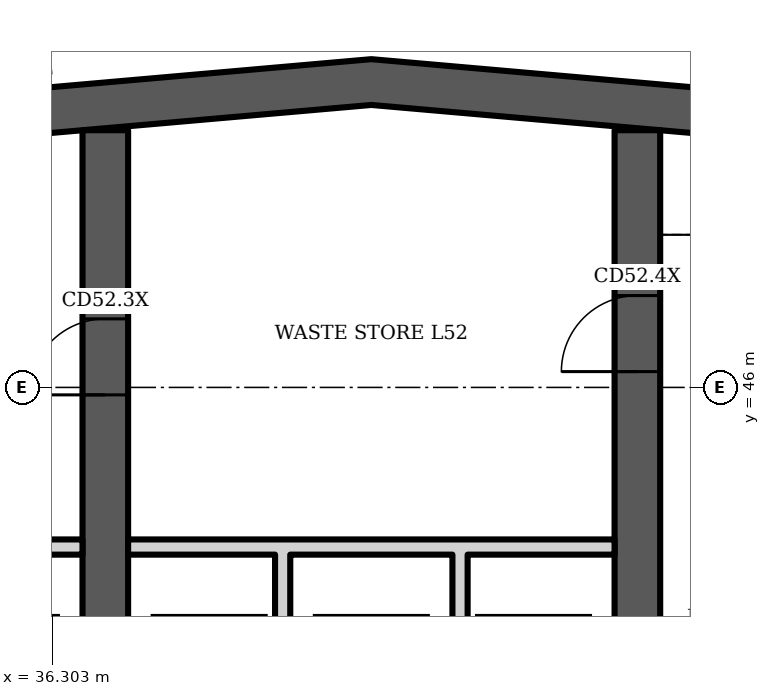
"""IFC4 building model, lengths in metres.
Left out: names, types, materials, properties, quantities, classifications, styles, units other than length and angle.
Written with IfcOpenShell. Run it as: python <this file> out.ifc"""

import sys

from ifc_helpers import new_model, si_unit, direction, frame, frame_2d, origin, place, context, subcontext, project, spatial, polyline, rectangle, outline, extrude, element, fill, save


model = new_model("IFC4")
c1 = context("Model", 3, precision=1e-05, world=origin(), true_north=direction((0.0, 1.0)))
c2 = subcontext(c1, "Body", "Model", "MODEL_VIEW")
j1 = project(units=[si_unit("LENGTHUNIT", "METRE"), si_unit("PLANEANGLEUNIT", "RADIAN")], contexts=[c1])
p1 = place(None, origin())
s1 = spatial("IfcSite", under=j1, at=p1, CompositionType="ELEMENT")
p2 = place(p1, origin())
s2 = spatial("IfcBuilding", under=s1, at=p2, CompositionType="ELEMENT")
p3 = place(p2, frame((0.0, 0.0, 210.7)))
s3 = spatial("IfcBuildingStorey", under=s2, at=p3, CompositionType="ELEMENT", Elevation=210.7)
p4 = place(p3, origin())
e1 = element("IfcWall", 1, at=p4, inside=s3, PredefinedType="SHEAR", context=c2, shape_type="SweptSolid", body=[
    extrude(outline(polyline([(23.0, 48.185), (40.5, 49.716), (58.0, 48.185), (58.0, 48.787), (40.5, 50.318), (23.0, 48.787), (23.0, 48.185)])), origin(), (0.0, 0.0, 1.0), 3.6),
])
p5 = place(p3, frame((37.0, 34.6, 0.0), z_axis=(0.0, 0.0, 1.0), x_axis=(0.0, 1.0, 0.0)))
e2 = element("IfcWall", 2, at=p5, inside=s3, PredefinedType="SHEAR", context=c2, shape_type="SweptSolid", body=[
    extrude(rectangle(XDim=14.784, YDim=0.6, at=frame_2d((7.392, 0.0))), origin(), (0.0, 0.0, 1.0), 3.6),
])
p6 = place(p5, frame((11.302, 0.0, 0.0)))
e3 = element("IfcOpeningElement", 3, at=p6, cuts=e2, PredefinedType="OPENING", context=c2, shape_type="SweptSolid", body=[
    extrude(rectangle(XDim=1.0, YDim=2.1, at=frame_2d((0.5, 1.05))), frame((0.0, 0.31, 0.0), z_axis=(0.0, -1.0, 0.0), x_axis=(1.0, 0.0, 0.0)), (0.0, 0.0, 1.0), 0.62),
])
p7 = place(p5, frame((3.8, 0.0, 0.0)))
e4 = element("IfcOpeningElement", 4, at=p7, cuts=e2, PredefinedType="OPENING", context=c2, shape_type="SweptSolid", body=[
    extrude(rectangle(XDim=1.1, YDim=2.1, at=frame_2d((0.55, 1.05))), frame((0.0, 0.31, 0.0), z_axis=(0.0, -1.0, 0.0), x_axis=(1.0, 0.0, 0.0)), (0.0, 0.0, 1.0), 0.62),
])
p8 = place(p3, frame((44.0, 34.6, 0.0), z_axis=(0.0, 0.0, 1.0), x_axis=(0.0, 1.0, 0.0)))
e5 = element("IfcWall", 5, at=p8, inside=s3, PredefinedType="SHEAR", context=c2, shape_type="SweptSolid", body=[
    extrude(rectangle(XDim=14.784, YDim=0.6, at=frame_2d((7.392, 0.0))), origin(), (0.0, 0.0, 1.0), 3.6),
])
p9 = place(p8, frame((11.608, 0.0, 0.0)))
e6 = element("IfcOpeningElement", 6, at=p9, cuts=e5, PredefinedType="OPENING", context=c2, shape_type="SweptSolid", body=[
    extrude(rectangle(XDim=1.0, YDim=2.1, at=frame_2d((0.5, 1.05))), frame((0.0, 0.31, 0.0), z_axis=(0.0, -1.0, 0.0), x_axis=(1.0, 0.0, 0.0)), (0.0, 0.0, 1.0), 0.62),
])
p10 = place(p8, frame((3.8, 0.0, 0.0)))
e7 = element("IfcOpeningElement", 7, at=p10, cuts=e5, PredefinedType="OPENING", context=c2, shape_type="SweptSolid", body=[
    extrude(rectangle(XDim=1.1, YDim=2.1, at=frame_2d((0.55, 1.05))), frame((0.0, 0.31, 0.0), z_axis=(0.0, -1.0, 0.0), x_axis=(1.0, 0.0, 0.0)), (0.0, 0.0, 1.0), 0.62),
])
p11 = place(p3, frame((0.0, 0.0, -0.0)))
e8 = element("IfcWall", 8, at=p11, inside=s3, PredefinedType="PARTITIONING", context=c2, shape_type="SweptSolid", body=[
    extrude(outline(polyline([(32.433, 40.8), (32.233, 40.8), (32.233, 43.8), (30.3, 43.8), (30.3, 44.0), (36.7, 44.0), (36.7, 43.8), (34.767, 43.8), (34.767, 40.8), (34.567, 40.8), (34.567, 43.8), (32.433, 43.8), (32.433, 40.8)])), origin(), (0.0, 0.0, 1.0), 3.2),
])
p12 = place(p3, frame((0.0, 0.0, -0.0)))
e9 = element("IfcWall", 9, at=p12, inside=s3, PredefinedType="PARTITIONING", context=c2, shape_type="SweptSolid", body=[
    extrude(outline(polyline([(39.433, 40.8), (39.233, 40.8), (39.233, 43.8), (37.3, 43.8), (37.3, 44.0), (43.7, 44.0), (43.7, 43.8), (41.767, 43.8), (41.767, 40.8), (41.567, 40.8), (41.567, 43.8), (39.433, 43.8), (39.433, 40.8)])), origin(), (0.0, 0.0, 1.0), 3.2),
])
p13 = place(p6, origin())
e10 = element("IfcDoor", 10, at=p13, inside=s3, OperationType="SINGLE_SWING_LEFT", PredefinedType="DOOR", context=c2, shape_type="SweptSolid", body=[
    extrude(rectangle(XDim=1.0, YDim=2.1, at=frame_2d((0.5, 1.05))), frame((0.0, 0.025, 0.0), z_axis=(0.0, -1.0, 0.0), x_axis=(1.0, 0.0, 0.0)), (0.0, 0.0, 1.0), 0.05),
])
fill(e3, e10)
p14 = place(p9, origin())
e11 = element("IfcDoor", 11, at=p14, inside=s3, OperationType="SINGLE_SWING_LEFT", PredefinedType="DOOR", context=c2, shape_type="SweptSolid", body=[
    extrude(rectangle(XDim=1.0, YDim=2.1, at=frame_2d((0.5, 1.05))), frame((0.0, 0.025, 0.0), z_axis=(0.0, -1.0, 0.0), x_axis=(1.0, 0.0, 0.0)), (0.0, 0.0, 1.0), 0.05),
])
fill(e6, e11)
save(model, sys.argv[1])
